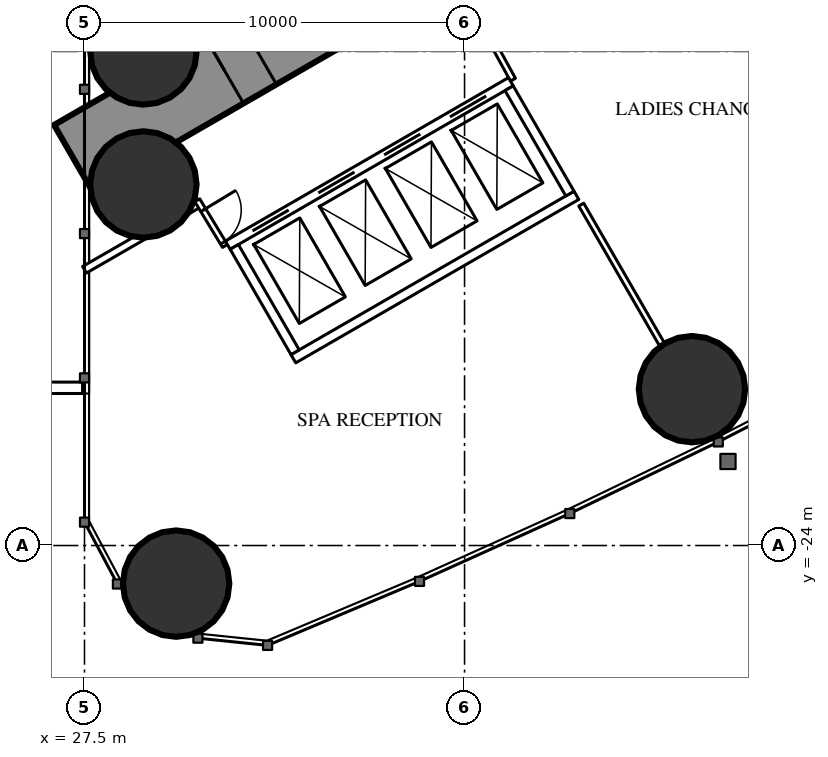
"""IFC4 building model, lengths in metres.
Left out: names, types, materials, properties, quantities, classifications, styles, units other than length and angle.
Written with IfcOpenShell. Run it as: python <this file> out.ifc"""

import sys

from ifc_helpers import new_model, si_unit, direction, frame, frame_2d, origin, origin_2d, place, context, subcontext, project, spatial, rectangle, hollow_circle, extrude, element, fill, save


model = new_model("IFC4")
c1 = context("Model", 3, precision=1e-05, world=origin(), true_north=direction((0.0, 1.0)))
c2 = subcontext(c1, "Body", "Model", "MODEL_VIEW")
j1 = project(units=[si_unit("LENGTHUNIT", "METRE"), si_unit("PLANEANGLEUNIT", "RADIAN")], contexts=[c1])
p1 = place(None, origin())
s1 = spatial("IfcSite", under=j1, at=p1, CompositionType="ELEMENT")
p2 = place(p1, origin())
s2 = spatial("IfcBuilding", under=s1, at=p2, CompositionType="ELEMENT")
p3 = place(p2, frame((0.0, 0.0, 12.6)))
s3 = spatial("IfcBuildingStorey", under=s2, at=p3, CompositionType="ELEMENT", Elevation=12.6)
for number, where, z_axis, x_axis in (
    (1, (29.911, -25.002, 0.0), (0.0, 0.0, 1.0), (1.0, 0.0, 0.0)),
    (2, (29.05, -11.0, 0.0), (0.0, 0.0, 1.0), (1.0, 0.0, 0.0)),
    (3, (29.05, -14.5, 0.0), (0.0, 0.0, 1.0), (1.0, 0.0, 0.0)),
    (4, (43.484, -19.886, 0.0), (0.0, 0.0, 1.0), (1.0, 0.0, 0.0)),
):
    element("IfcColumn", number, at=place(p3, frame(where, z_axis=z_axis, x_axis=x_axis)), inside=s3, PredefinedType="COLUMN", context=c2, shape_type="SweptSolid", body=[
        extrude(hollow_circle(Radius=1.4, WallThickness=0.12, at=origin_2d()), origin(), (0.0, 0.0, 1.0), 5.4),
    ])
p4 = place(p3, frame((27.2, -13.8, 0.0), z_axis=(0.0, 0.0, 1.0), x_axis=(0.866027159892, 0.499996958321, 0.0)))
e5 = element("IfcWall", 5, at=p4, inside=s3, PredefinedType="SHEAR", context=c2, shape_type="SweptSolid", body=[
    extrude(rectangle(XDim=27.947, YDim=2.0, at=frame_2d((13.973, 0.0))), origin(), (0.0, 0.0, 1.0), 5.4),
])
p5 = place(p4, frame((4.6, 0.0, 0.0)))
e6 = element("IfcOpeningElement", 6, at=p5, cuts=e5, PredefinedType="OPENING", context=c2, shape_type="SweptSolid", body=[
    extrude(rectangle(XDim=1.0, YDim=2.2, at=frame_2d((0.5, 1.1))), frame((0.0, 1.01, 0.0), z_axis=(0.0, -1.0, 0.0), x_axis=(1.0, 0.0, 0.0)), (0.0, 0.0, 1.0), 2.02),
])
p6 = place(p4, frame((13.395, 0.0, 0.0)))
e7 = element("IfcOpeningElement", 7, at=p6, cuts=e5, PredefinedType="OPENING", context=c2, shape_type="SweptSolid", body=[
    extrude(rectangle(XDim=1.8, YDim=2.2, at=frame_2d((0.9, 1.1))), frame((0.0, 1.01, 0.0), z_axis=(0.0, -1.0, 0.0), x_axis=(1.0, 0.0, 0.0)), (0.0, 0.0, 1.0), 2.02),
])
p7 = place(p3, frame((25.9, -19.85, 0.0), z_axis=(0.0, 0.0, 1.0), x_axis=(1.0, 0.0, 0.0)))
e8 = element("IfcWall", 8, at=p7, inside=s3, PredefinedType="PARAPET", context=c2, shape_type="SweptSolid", body=[
    extrude(rectangle(XDim=1.55, YDim=0.3, at=frame_2d((0.775, 0.0))), origin(), (0.0, 0.0, 1.0), 1.1),
])
p8 = place(p3, frame((40.57, -15.03, 0.0), z_axis=(0.0, 0.0, 1.0), x_axis=(0.500012993597, -0.866017901798, 0.0)))
e9 = element("IfcWall", 9, at=p8, inside=s3, PredefinedType="PARTITIONING", context=c2, shape_type="SweptSolid", body=[
    extrude(rectangle(XDim=4.243, YDim=0.15, at=frame_2d((2.122, 0.0))), origin(), (0.0, 0.0, 1.0), 5.15),
])
p9 = place(p3, frame((27.5, -16.744, 0.0), z_axis=(0.0, 0.0, 1.0), x_axis=(0.866034395887, 0.499984424899, 0.0)))
e10 = element("IfcWall", 10, at=p9, inside=s3, PredefinedType="PARTITIONING", context=c2, shape_type="SweptSolid", body=[
    extrude(rectangle(XDim=3.469, YDim=0.2, at=frame_2d((1.734, 0.0))), origin(), (0.0, 0.0, 1.0), 4.25),
])
p10 = place(p3, frame((30.467, -14.916, 0.0), z_axis=(0.0, 0.0, 1.0), x_axis=(0.518297865337, -0.855200165334, 0.0)))
e11 = element("IfcWall", 11, at=p10, inside=s3, PredefinedType="PARTITIONING", context=c2, shape_type="SweptSolid", body=[
    extrude(rectangle(XDim=1.405, YDim=0.15, at=frame_2d((0.703, 0.0))), origin(), (0.0, 0.0, 1.0), 5.15),
])
p11 = place(p10, frame((0.303, 0.0, 0.0)))
e12 = element("IfcOpeningElement", 12, at=p11, cuts=e11, PredefinedType="OPENING", context=c2, shape_type="SweptSolid", body=[
    extrude(rectangle(XDim=1.0, YDim=2.2, at=frame_2d((0.5, 1.1))), frame((0.0, 0.085, 0.0), z_axis=(0.0, -1.0, 0.0), x_axis=(1.0, 0.0, 0.0)), (0.0, 0.0, 1.0), 0.17),
])
p12 = place(p3, frame((38.773, -11.742, 0.0), z_axis=(0.0, 0.0, 1.0), x_axis=(-0.481418475768, 0.876490873421, 0.0)))
e13 = element("IfcWall", 13, at=p12, inside=s3, PredefinedType="PARTITIONING", context=c2, shape_type="SweptSolid", body=[
    extrude(rectangle(XDim=1.405, YDim=0.15, at=frame_2d((0.703, 0.0))), origin(), (0.0, 0.0, 1.0), 5.15),
])
p13 = place(p3, frame((31.271, -16.097, 0.0), z_axis=(0.0, 0.0, 1.0), x_axis=(0.86604045752, 0.499973925258, 0.0)))
e14 = element("IfcWall", 14, at=p13, inside=s3, PredefinedType="PARTITIONING", context=c2, shape_type="SweptSolid", body=[
    extrude(rectangle(XDim=8.6, YDim=0.25, at=frame_2d((4.3, 0.0))), origin(), (0.0, 0.0, 1.0), 5.15),
])
p14 = place(p13, frame((0.75, 0.0, 0.0)))
e15 = element("IfcOpeningElement", 15, at=p14, cuts=e14, PredefinedType="OPENING", context=c2, shape_type="SweptSolid", body=[
    extrude(rectangle(XDim=1.1, YDim=2.2, at=frame_2d((0.55, 1.1))), frame((0.0, 0.135, 0.0), z_axis=(0.0, -1.0, 0.0), x_axis=(1.0, 0.0, 0.0)), (0.0, 0.0, 1.0), 0.27),
])
p15 = place(p13, frame((2.75, 0.0, 0.0)))
e16 = element("IfcOpeningElement", 16, at=p15, cuts=e14, PredefinedType="OPENING", context=c2, shape_type="SweptSolid", body=[
    extrude(rectangle(XDim=1.1, YDim=2.2, at=frame_2d((0.55, 1.1))), frame((0.0, 0.135, 0.0), z_axis=(0.0, -1.0, 0.0), x_axis=(1.0, 0.0, 0.0)), (0.0, 0.0, 1.0), 0.27),
])
p16 = place(p13, frame((4.75, 0.0, 0.0)))
e17 = element("IfcOpeningElement", 17, at=p16, cuts=e14, PredefinedType="OPENING", context=c2, shape_type="SweptSolid", body=[
    extrude(rectangle(XDim=1.1, YDim=2.2, at=frame_2d((0.55, 1.1))), frame((0.0, 0.135, 0.0), z_axis=(0.0, -1.0, 0.0), x_axis=(1.0, 0.0, 0.0)), (0.0, 0.0, 1.0), 0.27),
])
p17 = place(p13, frame((6.75, 0.0, 0.0)))
e18 = element("IfcOpeningElement", 18, at=p17, cuts=e14, PredefinedType="OPENING", context=c2, shape_type="SweptSolid", body=[
    extrude(rectangle(XDim=1.1, YDim=2.2, at=frame_2d((0.55, 1.1))), frame((0.0, 0.135, 0.0), z_axis=(0.0, -1.0, 0.0), x_axis=(1.0, 0.0, 0.0)), (0.0, 0.0, 1.0), 0.27),
])
p18 = place(p3, frame((32.996, -19.086, 0.0), z_axis=(0.0, 0.0, 1.0), x_axis=(0.866028165386, 0.499995216735, 0.0)))
e19 = element("IfcWall", 19, at=p18, inside=s3, PredefinedType="PARTITIONING", context=c2, shape_type="SweptSolid", body=[
    extrude(rectangle(XDim=8.6, YDim=0.25, at=frame_2d((4.3, 0.0))), origin(), (0.0, 0.0, 1.0), 5.15),
])
for number, where, z_axis, x_axis in (
    (20, (31.441, -16.143, 0.0), (0.0, 0.0, 1.0), (0.5, -0.866, 0.0)),
    (21, (38.673, -11.968, 0.0), (0.0, 0.0, 1.0), (0.5, -0.866, 0.0)),
):
    element("IfcWall", number, at=place(p3, frame(where, z_axis=z_axis, x_axis=x_axis)), inside=s3, PredefinedType="PARTITIONING", context=c2, shape_type="SweptSolid", body=[
        extrude(rectangle(XDim=3.201, YDim=0.25, at=frame_2d((1.6, 0.0))), origin(), (0.0, 0.0, 1.0), 5.15),
    ])
p19 = place(p11, origin())
e22 = element("IfcDoor", 22, at=p19, inside=s3, OperationType="SINGLE_SWING_LEFT", PredefinedType="DOOR", context=c2, shape_type="SweptSolid", body=[
    extrude(rectangle(XDim=1.0, YDim=2.2, at=frame_2d((0.5, 1.1))), frame((0.0, 0.025, 0.0), z_axis=(0.0, -1.0, 0.0), x_axis=(1.0, 0.0, 0.0)), (0.0, 0.0, 1.0), 0.05),
])
fill(e12, e22)
p20 = place(p5, origin())
e23 = element("IfcDoor", 23, at=p20, inside=s3, OperationType="SINGLE_SWING_LEFT", PredefinedType="DOOR", context=c2, shape_type="SweptSolid", body=[
    extrude(rectangle(XDim=1.0, YDim=2.2, at=frame_2d((0.5, 1.1))), frame((0.0, 0.025, 0.0), z_axis=(0.0, -1.0, 0.0), x_axis=(1.0, 0.0, 0.0)), (0.0, 0.0, 1.0), 0.05),
])
fill(e6, e23)
p21 = place(p14, origin())
e24 = element("IfcDoor", 24, at=p21, inside=s3, OperationType="DOUBLE_DOOR_SLIDING", PredefinedType="USERDEFINED", context=c2, shape_type="SweptSolid", body=[
    extrude(rectangle(XDim=1.1, YDim=2.2, at=frame_2d((0.55, 1.1))), frame((0.0, 0.025, 0.0), z_axis=(0.0, -1.0, 0.0), x_axis=(1.0, 0.0, 0.0)), (0.0, 0.0, 1.0), 0.05),
])
fill(e15, e24)
p22 = place(p15, origin())
e25 = element("IfcDoor", 25, at=p22, inside=s3, OperationType="DOUBLE_DOOR_SLIDING", PredefinedType="USERDEFINED", context=c2, shape_type="SweptSolid", body=[
    extrude(rectangle(XDim=1.1, YDim=2.2, at=frame_2d((0.55, 1.1))), frame((0.0, 0.025, 0.0), z_axis=(0.0, -1.0, 0.0), x_axis=(1.0, 0.0, 0.0)), (0.0, 0.0, 1.0), 0.05),
])
fill(e16, e25)
p23 = place(p16, origin())
e26 = element("IfcDoor", 26, at=p23, inside=s3, OperationType="DOUBLE_DOOR_SLIDING", PredefinedType="USERDEFINED", context=c2, shape_type="SweptSolid", body=[
    extrude(rectangle(XDim=1.1, YDim=2.2, at=frame_2d((0.55, 1.1))), frame((0.0, 0.025, 0.0), z_axis=(0.0, -1.0, 0.0), x_axis=(1.0, 0.0, 0.0)), (0.0, 0.0, 1.0), 0.05),
])
fill(e17, e26)
p24 = place(p17, origin())
e27 = element("IfcDoor", 27, at=p24, inside=s3, OperationType="DOUBLE_DOOR_SLIDING", PredefinedType="USERDEFINED", context=c2, shape_type="SweptSolid", body=[
    extrude(rectangle(XDim=1.1, YDim=2.2, at=frame_2d((0.55, 1.1))), frame((0.0, 0.025, 0.0), z_axis=(0.0, -1.0, 0.0), x_axis=(1.0, 0.0, 0.0)), (0.0, 0.0, 1.0), 0.05),
])
fill(e18, e27)
save(model, sys.argv[1])
